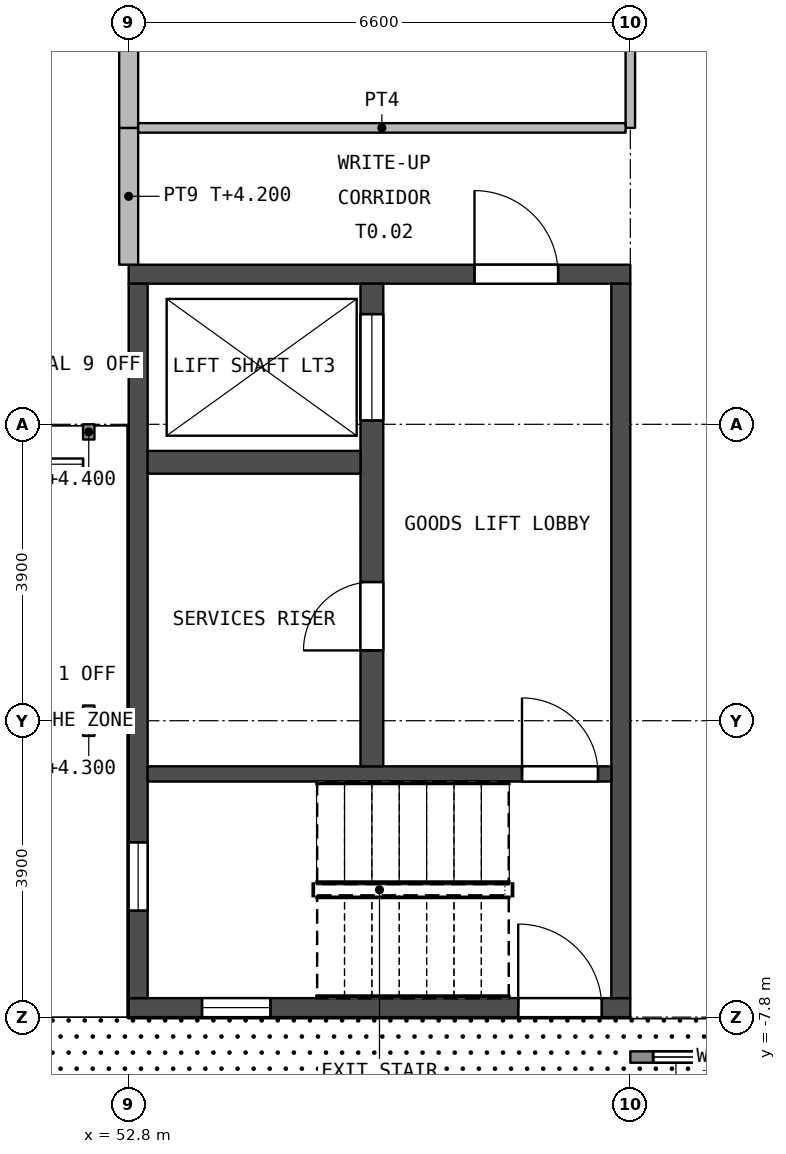
"""IFC4 building model, lengths in metres.
Left out: names, types, materials, properties, quantities, classifications, styles, units other than length and angle.
Written with IfcOpenShell. Run it as: python <this file> out.ifc"""

import sys

from ifc_helpers import new_model, si_unit, direction, frame, frame_2d, origin, place, context, subcontext, project, spatial, rectangle, extrude, element, fill, save


model = new_model("IFC4")
c1 = context("Model", 3, precision=1e-05, world=origin(), true_north=direction((0.0, 1.0)))
c2 = subcontext(c1, "Body", "Model", "MODEL_VIEW")
j1 = project(units=[si_unit("LENGTHUNIT", "METRE"), si_unit("PLANEANGLEUNIT", "RADIAN")], contexts=[c1])
p1 = place(None, origin())
s1 = spatial("IfcSite", under=j1, at=p1, CompositionType="ELEMENT")
p2 = place(p1, origin())
s2 = spatial("IfcBuilding", under=s1, at=p2, CompositionType="ELEMENT")
p3 = place(p2, origin())
s3 = spatial("IfcBuildingStorey", under=s2, at=p3, CompositionType="ELEMENT", Elevation=0.0)
p4 = place(p3, frame((59.4, 1.975, 0.0), z_axis=(0.0, 0.0, 1.0), x_axis=(-1.0, 0.0, 0.0)))
e1 = element("IfcWall", 1, at=p4, inside=s3, PredefinedType="SHEAR", context=c2, shape_type="SweptSolid", body=[
    extrude(rectangle(XDim=6.6, YDim=0.25, at=frame_2d((3.3, 0.0))), origin(), (0.0, 0.0, 1.0), 5.1),
])
p5 = place(p4, frame((0.95, 0.0, 0.0)))
e2 = element("IfcOpeningElement", 2, at=p5, cuts=e1, PredefinedType="OPENING", context=c2, shape_type="SweptSolid", body=[
    extrude(rectangle(XDim=1.1, YDim=2.1, at=frame_2d((0.55, 1.05))), frame((0.0, 0.135, 0.0), z_axis=(0.0, -1.0, 0.0), x_axis=(1.0, 0.0, 0.0)), (0.0, 0.0, 1.0), 0.27),
])
p6 = place(p3, frame((59.4, -7.675, 0.0), z_axis=(0.0, 0.0, 1.0), x_axis=(-1.0, 0.0, 0.0)))
e3 = element("IfcWall", 3, at=p6, inside=s3, PredefinedType="SHEAR", context=c2, shape_type="SweptSolid", body=[
    extrude(rectangle(XDim=6.6, YDim=0.25, at=frame_2d((3.3, 0.0))), origin(), (0.0, 0.0, 1.0), 5.1),
])
p7 = place(p6, frame((0.375, 0.0, 0.0)))
e4 = element("IfcOpeningElement", 4, at=p7, cuts=e3, PredefinedType="OPENING", context=c2, shape_type="SweptSolid", body=[
    extrude(rectangle(XDim=1.1, YDim=2.4, at=frame_2d((0.55, 1.2))), frame((0.0, 0.135, 0.0), z_axis=(0.0, -1.0, 0.0), x_axis=(1.0, 0.0, 0.0)), (0.0, 0.0, 1.0), 0.27),
])
p8 = place(p6, frame((4.735, 0.0, 2.05)))
e5 = element("IfcOpeningElement", 5, at=p8, cuts=e3, PredefinedType="OPENING", context=c2, shape_type="SweptSolid", body=[
    extrude(rectangle(XDim=0.9, YDim=1.2, at=frame_2d((0.45, 0.6))), frame((0.0, 0.135, 0.0), z_axis=(0.0, -1.0, 0.0), x_axis=(1.0, 0.0, 0.0)), (0.0, 0.0, 1.0), 0.27),
])
p9 = place(p3, frame((59.275, 1.85, 0.0), z_axis=(0.0, 0.0, 1.0), x_axis=(0.0, -1.0, 0.0)))
e6 = element("IfcWall", 6, at=p9, inside=s3, PredefinedType="SHEAR", context=c2, shape_type="SweptSolid", body=[
    extrude(rectangle(XDim=9.4, YDim=0.25, at=frame_2d((4.7, 0.0))), origin(), (0.0, 0.0, 1.0), 5.1),
])
p10 = place(p3, frame((52.925, 1.85, 0.0), z_axis=(0.0, 0.0, 1.0), x_axis=(0.0, -1.0, 0.0)))
e7 = element("IfcWall", 7, at=p10, inside=s3, PredefinedType="SHEAR", context=c2, shape_type="SweptSolid", body=[
    extrude(rectangle(XDim=9.4, YDim=0.25, at=frame_2d((4.7, 0.0))), origin(), (0.0, 0.0, 1.0), 5.1),
])
p11 = place(p10, frame((7.35, 0.0, 2.05)))
e8 = element("IfcOpeningElement", 8, at=p11, cuts=e7, PredefinedType="OPENING", context=c2, shape_type="SweptSolid", body=[
    extrude(rectangle(XDim=0.9, YDim=1.2, at=frame_2d((0.45, 0.6))), frame((0.0, 0.135, 0.0), z_axis=(0.0, -1.0, 0.0), x_axis=(1.0, 0.0, 0.0)), (0.0, 0.0, 1.0), 0.27),
])
p12 = place(p3, frame((59.15, -4.6, 0.0), z_axis=(0.0, 0.0, 1.0), x_axis=(-1.0, 0.0, 0.0)))
e9 = element("IfcWall", 9, at=p12, inside=s3, PredefinedType="SHEAR", context=c2, shape_type="SweptSolid", body=[
    extrude(rectangle(XDim=6.1, YDim=0.2, at=frame_2d((3.05, 0.0))), origin(), (0.0, 0.0, 1.0), 5.1),
])
p13 = place(p12, frame((0.175, 0.0, 0.0)))
e10 = element("IfcOpeningElement", 10, at=p13, cuts=e9, PredefinedType="OPENING", context=c2, shape_type="SweptSolid", body=[
    extrude(rectangle(XDim=1.0, YDim=2.1, at=frame_2d((0.5, 1.05))), frame((0.0, 0.11, 0.0), z_axis=(0.0, -1.0, 0.0), x_axis=(1.0, 0.0, 0.0)), (0.0, 0.0, 1.0), 0.22),
])
p14 = place(p3, frame((56.0, 1.85, 0.0), z_axis=(0.0, 0.0, 1.0), x_axis=(0.0, -1.0, 0.0)))
e11 = element("IfcWall", 11, at=p14, inside=s3, PredefinedType="SHEAR", context=c2, shape_type="SweptSolid", body=[
    extrude(rectangle(XDim=6.35, YDim=0.3, at=frame_2d((3.175, 0.0))), origin(), (0.0, 0.0, 1.0), 5.1),
])
p15 = place(p14, frame((3.925, 0.0, 0.0)))
e12 = element("IfcOpeningElement", 12, at=p15, cuts=e11, PredefinedType="OPENING", context=c2, shape_type="SweptSolid", body=[
    extrude(rectangle(XDim=0.9, YDim=2.1, at=frame_2d((0.45, 1.05))), frame((0.0, 0.16, 0.0), z_axis=(0.0, -1.0, 0.0), x_axis=(1.0, 0.0, 0.0)), (0.0, 0.0, 1.0), 0.32),
])
p16 = place(p14, frame((0.4, 0.0, 0.0)))
e13 = element("IfcOpeningElement", 13, at=p16, cuts=e11, PredefinedType="OPENING", context=c2, shape_type="SweptSolid", body=[
    extrude(rectangle(XDim=1.4, YDim=2.4, at=frame_2d((0.7, 1.2))), frame((0.0, 0.16, 0.0), z_axis=(0.0, -1.0, 0.0), x_axis=(1.0, 0.0, 0.0)), (0.0, 0.0, 1.0), 0.32),
])
p17 = place(p3, frame((55.85, -0.5, 0.0), z_axis=(0.0, 0.0, 1.0), x_axis=(-1.0, 0.0, 0.0)))
e14 = element("IfcWall", 14, at=p17, inside=s3, PredefinedType="SHEAR", context=c2, shape_type="SweptSolid", body=[
    extrude(rectangle(XDim=2.8, YDim=0.3, at=frame_2d((1.4, 0.0))), origin(), (0.0, 0.0, 1.0), 5.1),
])
p18 = place(p3, frame((66.0, -8.325, 0.0), z_axis=(0.0, 0.0, 1.0), x_axis=(-1.0, 0.0, 0.0)))
e15 = element("IfcWall", 15, at=p18, inside=s3, PredefinedType="STANDARD", context=c2, shape_type="SweptSolid", body=[
    extrude(rectangle(XDim=6.6, YDim=0.15, at=frame_2d((3.3, 0.0))), origin(), (0.0, 0.0, 1.0), 5.1),
])
p19 = place(p18, frame((2.1, 0.0, 0.0)))
e16 = element("IfcOpeningElement", 16, at=p19, cuts=e15, PredefinedType="OPENING", context=c2, shape_type="SweptSolid", body=[
    extrude(rectangle(XDim=2.4, YDim=2.7, at=frame_2d((1.2, 1.35))), frame((0.0, 0.085, 0.0), z_axis=(0.0, -1.0, 0.0), x_axis=(1.0, 0.0, 0.0)), (0.0, 0.0, 1.0), 0.17),
])
p20 = place(p18, frame((4.7, 0.0, 0.1)))
e17 = element("IfcOpeningElement", 17, at=p20, cuts=e15, PredefinedType="OPENING", context=c2, shape_type="SweptSolid", body=[
    extrude(rectangle(XDim=1.6, YDim=2.6, at=frame_2d((0.8, 1.3))), frame((0.0, 0.085, 0.0), z_axis=(0.0, -1.0, 0.0), x_axis=(1.0, 0.0, 0.0)), (0.0, 0.0, 1.0), 0.17),
])
p21 = place(p18, frame((0.3, 0.0, 0.1)))
e18 = element("IfcOpeningElement", 18, at=p21, cuts=e15, PredefinedType="OPENING", context=c2, shape_type="SweptSolid", body=[
    extrude(rectangle(XDim=1.6, YDim=2.6, at=frame_2d((0.8, 1.3))), frame((0.0, 0.085, 0.0), z_axis=(0.0, -1.0, 0.0), x_axis=(1.0, 0.0, 0.0)), (0.0, 0.0, 1.0), 0.17),
])
p22 = place(p18, frame((0.3, 0.0, 2.85)))
e19 = element("IfcOpeningElement", 19, at=p22, cuts=e15, PredefinedType="OPENING", context=c2, shape_type="SweptSolid", body=[
    extrude(rectangle(XDim=6.0, YDim=2.1, at=frame_2d((3.0, 1.05))), frame((0.0, 0.085, 0.0), z_axis=(0.0, -1.0, 0.0), x_axis=(1.0, 0.0, 0.0)), (0.0, 0.0, 1.0), 0.17),
])
p23 = place(p3, frame((52.275, -4.1, 0.0), z_axis=(0.0, 0.0, 1.0), x_axis=(0.0, 1.0, 0.0)))
e20 = element("IfcWall", 20, at=p23, inside=s3, PredefinedType="STANDARD", context=c2, shape_type="SweptSolid", body=[
    extrude(rectangle(XDim=0.4, YDim=0.15, at=frame_2d((0.2, 0.0))), origin(), (0.0, 0.0, 1.0), 4.3),
])
p24 = place(p3, frame((52.275, -0.2, 0.0), z_axis=(0.0, 0.0, 1.0), x_axis=(0.0, 1.0, 0.0)))
e21 = element("IfcWall", 21, at=p24, inside=s3, PredefinedType="STANDARD", context=c2, shape_type="SweptSolid", body=[
    extrude(rectangle(XDim=0.2, YDim=0.15, at=frame_2d((0.1, 0.0))), origin(), (0.0, 0.0, 1.0), 4.4),
])
p25 = place(p3, frame((52.8, 2.1, 0.0), z_axis=(0.0, 0.0, 1.0), x_axis=(0.0, 1.0, 0.0)))
e22 = element("IfcWall", 22, at=p25, inside=s3, PredefinedType="PARTITIONING", context=c2, shape_type="SweptSolid", body=[
    extrude(rectangle(XDim=1.8, YDim=0.25, at=frame_2d((0.9, 0.0))), origin(), (0.0, 0.0, 1.0), 4.2),
])
p26 = place(p3, frame((52.8, 3.9, 0.0), z_axis=(0.0, 0.0, 1.0), x_axis=(0.0, 1.0, 0.0)))
e23 = element("IfcWall", 23, at=p26, inside=s3, PredefinedType="PARTITIONING", context=c2, shape_type="SweptSolid", body=[
    extrude(rectangle(XDim=5.55, YDim=0.25, at=frame_2d((2.775, 0.0))), origin(), (0.0, 0.0, 1.0), 4.2),
])
p27 = place(p3, frame((59.4, 9.45, 0.0), z_axis=(0.0, 0.0, 1.0), x_axis=(0.0, -1.0, 0.0)))
e24 = element("IfcWall", 24, at=p27, inside=s3, PredefinedType="PARTITIONING", context=c2, shape_type="SweptSolid", body=[
    extrude(rectangle(XDim=5.55, YDim=0.125, at=frame_2d((2.775, 0.0))), origin(), (0.0, 0.0, 1.0), 4.2),
])
p28 = place(p3, frame((59.337, 3.9, 0.0), z_axis=(0.0, 0.0, 1.0), x_axis=(-1.0, 0.0, 0.0)))
e25 = element("IfcWall", 25, at=p28, inside=s3, PredefinedType="PARTITIONING", context=c2, shape_type="SweptSolid", body=[
    extrude(rectangle(XDim=6.412, YDim=0.125, at=frame_2d((3.206, 0.0))), origin(), (0.0, 0.0, 1.0), 5.1),
])
p29 = place(p15, origin())
e26 = element("IfcDoor", 26, at=p29, inside=s3, OperationType="SINGLE_SWING_RIGHT", PredefinedType="DOOR", context=c2, shape_type="SweptSolid", body=[
    extrude(rectangle(XDim=0.9, YDim=2.1, at=frame_2d((0.45, 1.05))), frame((0.0, 0.025, 0.0), z_axis=(0.0, -1.0, 0.0), x_axis=(1.0, 0.0, 0.0)), (0.0, 0.0, 1.0), 0.05),
])
fill(e12, e26)
p30 = place(p5, origin())
e27 = element("IfcDoor", 27, at=p30, inside=s3, OperationType="SINGLE_SWING_RIGHT", PredefinedType="DOOR", context=c2, shape_type="SweptSolid", body=[
    extrude(rectangle(XDim=1.1, YDim=2.1, at=frame_2d((0.55, 1.05))), frame((0.0, 0.025, 0.0), z_axis=(0.0, -1.0, 0.0), x_axis=(1.0, 0.0, 0.0)), (0.0, 0.0, 1.0), 0.05),
])
fill(e2, e27)
p31 = place(p13, origin())
e28 = element("IfcDoor", 28, at=p31, inside=s3, OperationType="SINGLE_SWING_RIGHT", PredefinedType="DOOR", context=c2, shape_type="SweptSolid", body=[
    extrude(rectangle(XDim=1.0, YDim=2.1, at=frame_2d((0.5, 1.05))), frame((0.0, 0.025, 0.0), z_axis=(0.0, -1.0, 0.0), x_axis=(1.0, 0.0, 0.0)), (0.0, 0.0, 1.0), 0.05),
])
fill(e10, e28)
p32 = place(p7, origin())
e29 = element("IfcDoor", 29, at=p32, inside=s3, OperationType="SINGLE_SWING_RIGHT", PredefinedType="DOOR", context=c2, shape_type="SweptSolid", body=[
    extrude(rectangle(XDim=1.1, YDim=2.4, at=frame_2d((0.55, 1.2))), frame((0.0, 0.025, 0.0), z_axis=(0.0, -1.0, 0.0), x_axis=(1.0, 0.0, 0.0)), (0.0, 0.0, 1.0), 0.05),
])
fill(e4, e29)
p33 = place(p16, origin())
e30 = element("IfcDoor", 30, at=p33, inside=s3, OperationType="DOUBLE_DOOR_SLIDING", PredefinedType="NOTDEFINED", context=c2, shape_type="SweptSolid", body=[
    extrude(rectangle(XDim=1.4, YDim=2.4, at=frame_2d((0.7, 1.2))), frame((0.0, 0.025, 0.0), z_axis=(0.0, -1.0, 0.0), x_axis=(1.0, 0.0, 0.0)), (0.0, 0.0, 1.0), 0.05),
])
fill(e13, e30)
p34 = place(p8, origin())
e31 = element("IfcWindow", 31, at=p34, inside=s3, PartitioningType="SINGLE_PANEL", PredefinedType="WINDOW", context=c2, shape_type="SweptSolid", body=[
    extrude(rectangle(XDim=0.9, YDim=1.2, at=frame_2d((0.45, 0.6))), frame((0.0, 0.03, 0.0), z_axis=(0.0, -1.0, 0.0), x_axis=(1.0, 0.0, 0.0)), (0.0, 0.0, 1.0), 0.06),
])
fill(e5, e31)
p35 = place(p11, origin())
e32 = element("IfcWindow", 32, at=p35, inside=s3, PartitioningType="SINGLE_PANEL", PredefinedType="WINDOW", context=c2, shape_type="SweptSolid", body=[
    extrude(rectangle(XDim=0.9, YDim=1.2, at=frame_2d((0.45, 0.6))), frame((0.0, 0.03, 0.0), z_axis=(0.0, -1.0, 0.0), x_axis=(1.0, 0.0, 0.0)), (0.0, 0.0, 1.0), 0.06),
])
fill(e8, e32)
p36 = place(p20, origin())
e33 = element("IfcWindow", 33, at=p36, inside=s3, PartitioningType="SINGLE_PANEL", PredefinedType="WINDOW", context=c2, shape_type="SweptSolid", body=[
    extrude(rectangle(XDim=1.6, YDim=2.6, at=frame_2d((0.8, 1.3))), frame((0.0, 0.03, 0.0), z_axis=(0.0, -1.0, 0.0), x_axis=(1.0, 0.0, 0.0)), (0.0, 0.0, 1.0), 0.06),
])
fill(e17, e33)
p37 = place(p22, origin())
e34 = element("IfcWindow", 34, at=p37, inside=s3, PartitioningType="SINGLE_PANEL", PredefinedType="WINDOW", context=c2, shape_type="SweptSolid", body=[
    extrude(rectangle(XDim=6.0, YDim=2.1, at=frame_2d((3.0, 1.05))), frame((0.0, 0.03, 0.0), z_axis=(0.0, -1.0, 0.0), x_axis=(1.0, 0.0, 0.0)), (0.0, 0.0, 1.0), 0.06),
])
fill(e19, e34)
save(model, sys.argv[1])
